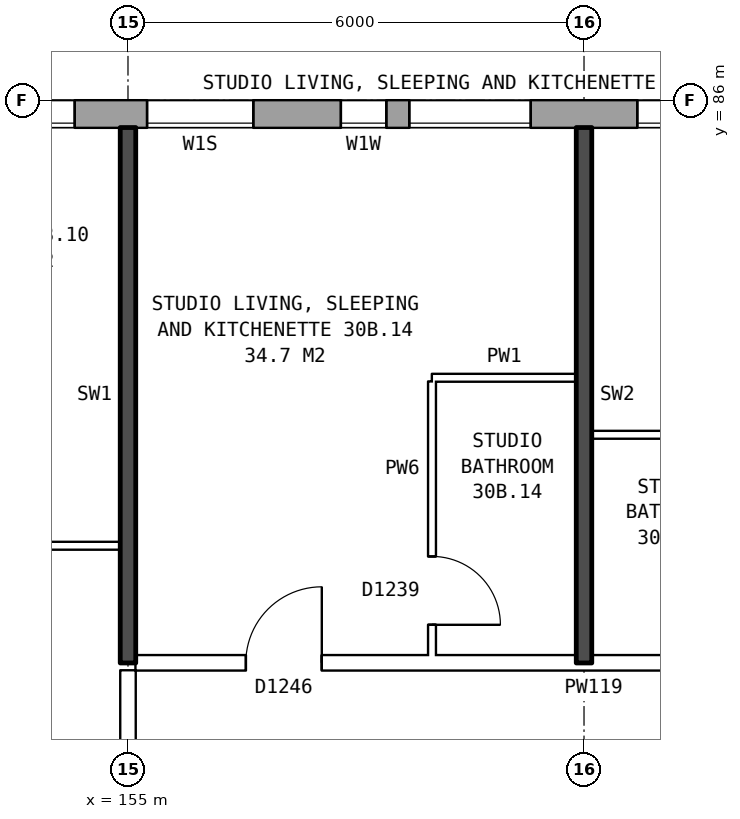
"""IFC4 building model, lengths in metres.
Left out: names, types, materials, properties, quantities, classifications, styles, units other than length and angle.
Written with IfcOpenShell. Run it as: python <this file> out.ifc"""

import sys

from ifc_helpers import new_model, si_unit, direction, frame, frame_2d, origin, place, context, subcontext, project, spatial, rectangle, extrude, element, fill, save


model = new_model("IFC4")
c1 = context("Model", 3, precision=1e-05, world=origin(), true_north=direction((0.0, 1.0)))
c2 = subcontext(c1, "Body", "Model", "MODEL_VIEW")
j1 = project(units=[si_unit("LENGTHUNIT", "METRE"), si_unit("PLANEANGLEUNIT", "RADIAN")], contexts=[c1])
p1 = place(None, origin())
s1 = spatial("IfcSite", under=j1, at=p1, CompositionType="ELEMENT")
p2 = place(p1, origin())
s2 = spatial("IfcBuilding", under=s1, at=p2, CompositionType="ELEMENT")
p3 = place(p2, frame((0.0, 0.0, 108.8)))
s3 = spatial("IfcBuildingStorey", under=s2, at=p3, CompositionType="ELEMENT", Elevation=108.8)
p4 = place(p3, frame((170.925, 85.82, 0.0), z_axis=(0.0, 0.0, 1.0), x_axis=(-1.0, 0.0, 0.0)))
e1 = element("IfcWall", 1, at=p4, inside=s3, PredefinedType="STANDARD", context=c2, shape_type="SweptSolid", body=[
    extrude(rectangle(XDim=36.851, YDim=0.36, at=frame_2d((18.425, 0.0))), origin(), (0.0, 0.0, 1.0), 2.85),
])
p5 = place(p4, frame((1.625, 0.0, 0.8)))
e2 = element("IfcOpeningElement", 2, at=p5, cuts=e1, PredefinedType="OPENING", context=c2, shape_type="SweptSolid", body=[
    extrude(rectangle(XDim=1.6, YDim=1.8, at=frame_2d((0.8, 0.9))), frame((0.0, 0.19, 0.0), z_axis=(0.0, -1.0, 0.0), x_axis=(1.0, 0.0, 0.0)), (0.0, 0.0, 1.0), 0.38),
])
p6 = place(p4, frame((4.625, 0.0, 0.8)))
e3 = element("IfcOpeningElement", 3, at=p6, cuts=e1, PredefinedType="OPENING", context=c2, shape_type="SweptSolid", body=[
    extrude(rectangle(XDim=1.6, YDim=1.8, at=frame_2d((0.8, 0.9))), frame((0.0, 0.19, 0.0), z_axis=(0.0, -1.0, 0.0), x_axis=(1.0, 0.0, 0.0)), (0.0, 0.0, 1.0), 0.38),
])
p7 = place(p4, frame((7.625, 0.0, 0.8)))
e4 = element("IfcOpeningElement", 4, at=p7, cuts=e1, PredefinedType="OPENING", context=c2, shape_type="SweptSolid", body=[
    extrude(rectangle(XDim=1.6, YDim=1.8, at=frame_2d((0.8, 0.9))), frame((0.0, 0.19, 0.0), z_axis=(0.0, -1.0, 0.0), x_axis=(1.0, 0.0, 0.0)), (0.0, 0.0, 1.0), 0.38),
])
p8 = place(p4, frame((10.625, 0.0, 0.8)))
e5 = element("IfcOpeningElement", 5, at=p8, cuts=e1, PredefinedType="OPENING", context=c2, shape_type="SweptSolid", body=[
    extrude(rectangle(XDim=1.6, YDim=1.8, at=frame_2d((0.8, 0.9))), frame((0.0, 0.19, 0.0), z_axis=(0.0, -1.0, 0.0), x_axis=(1.0, 0.0, 0.0)), (0.0, 0.0, 1.0), 0.38),
])
p9 = place(p4, frame((12.525, 0.0, 1.7)))
e6 = element("IfcOpeningElement", 6, at=p9, cuts=e1, PredefinedType="OPENING", context=c2, shape_type="SweptSolid", body=[
    extrude(rectangle(XDim=0.6, YDim=0.9, at=frame_2d((0.3, 0.45))), frame((0.0, 0.19, 0.0), z_axis=(0.0, -1.0, 0.0), x_axis=(1.0, 0.0, 0.0)), (0.0, 0.0, 1.0), 0.38),
])
p10 = place(p4, frame((16.625, 0.0, 0.8)))
e7 = element("IfcOpeningElement", 7, at=p10, cuts=e1, PredefinedType="OPENING", context=c2, shape_type="SweptSolid", body=[
    extrude(rectangle(XDim=1.6, YDim=1.8, at=frame_2d((0.8, 0.9))), frame((0.0, 0.19, 0.0), z_axis=(0.0, -1.0, 0.0), x_axis=(1.0, 0.0, 0.0)), (0.0, 0.0, 1.0), 0.38),
])
p11 = place(p4, frame((19.625, 0.0, 0.8)))
e8 = element("IfcOpeningElement", 8, at=p11, cuts=e1, PredefinedType="OPENING", context=c2, shape_type="SweptSolid", body=[
    extrude(rectangle(XDim=1.6, YDim=1.8, at=frame_2d((0.8, 0.9))), frame((0.0, 0.19, 0.0), z_axis=(0.0, -1.0, 0.0), x_axis=(1.0, 0.0, 0.0)), (0.0, 0.0, 1.0), 0.38),
])
p12 = place(p4, frame((22.125, 0.0, 0.15)))
e9 = element("IfcOpeningElement", 9, at=p12, cuts=e1, PredefinedType="OPENING", context=c2, shape_type="SweptSolid", body=[
    extrude(rectangle(XDim=1.2, YDim=0.9, at=frame_2d((0.6, 0.45))), frame((0.0, 0.19, 0.0), z_axis=(0.0, -1.0, 0.0), x_axis=(1.0, 0.0, 0.0)), (0.0, 0.0, 1.0), 0.38),
])
p13 = place(p4, frame((25.625, 0.0, 0.8)))
e10 = element("IfcOpeningElement", 10, at=p13, cuts=e1, PredefinedType="OPENING", context=c2, shape_type="SweptSolid", body=[
    extrude(rectangle(XDim=1.6, YDim=1.8, at=frame_2d((0.8, 0.9))), frame((0.0, 0.19, 0.0), z_axis=(0.0, -1.0, 0.0), x_axis=(1.0, 0.0, 0.0)), (0.0, 0.0, 1.0), 0.38),
])
p14 = place(p4, frame((28.625, 0.0, 0.8)))
e11 = element("IfcOpeningElement", 11, at=p14, cuts=e1, PredefinedType="OPENING", context=c2, shape_type="SweptSolid", body=[
    extrude(rectangle(XDim=1.6, YDim=1.8, at=frame_2d((0.8, 0.9))), frame((0.0, 0.19, 0.0), z_axis=(0.0, -1.0, 0.0), x_axis=(1.0, 0.0, 0.0)), (0.0, 0.0, 1.0), 0.38),
])
p15 = place(p4, frame((31.625, 0.0, 0.8)))
e12 = element("IfcOpeningElement", 12, at=p15, cuts=e1, PredefinedType="OPENING", context=c2, shape_type="SweptSolid", body=[
    extrude(rectangle(XDim=1.6, YDim=1.8, at=frame_2d((0.8, 0.9))), frame((0.0, 0.19, 0.0), z_axis=(0.0, -1.0, 0.0), x_axis=(1.0, 0.0, 0.0)), (0.0, 0.0, 1.0), 0.38),
])
p16 = place(p4, frame((34.625, 0.0, 0.8)))
e13 = element("IfcOpeningElement", 13, at=p16, cuts=e1, PredefinedType="OPENING", context=c2, shape_type="SweptSolid", body=[
    extrude(rectangle(XDim=1.6, YDim=1.8, at=frame_2d((0.8, 0.9))), frame((0.0, 0.19, 0.0), z_axis=(0.0, -1.0, 0.0), x_axis=(1.0, 0.0, 0.0)), (0.0, 0.0, 1.0), 0.38),
])
p17 = place(p4, frame((14.275, 0.0, 0.8)))
e14 = element("IfcOpeningElement", 14, at=p17, cuts=e1, PredefinedType="OPENING", context=c2, shape_type="SweptSolid", body=[
    extrude(rectangle(XDim=1.4, YDim=0.9, at=frame_2d((0.7, 0.45))), frame((0.0, 0.19, 0.0), z_axis=(0.0, -1.0, 0.0), x_axis=(1.0, 0.0, 0.0)), (0.0, 0.0, 1.0), 0.38),
])
p18 = place(p4, frame((23.775, 0.0, 1.65)))
e15 = element("IfcOpeningElement", 15, at=p18, cuts=e1, PredefinedType="OPENING", context=c2, shape_type="SweptSolid", body=[
    extrude(rectangle(XDim=1.0, YDim=0.9, at=frame_2d((0.5, 0.45))), frame((0.0, 0.19, 0.0), z_axis=(0.0, -1.0, 0.0), x_axis=(1.0, 0.0, 0.0)), (0.0, 0.0, 1.0), 0.38),
])
p19 = place(p3, frame((155.1, 78.6, 0.0), z_axis=(0.0, 0.0, 1.0), x_axis=(1.0, 0.0, 0.0)))
e16 = element("IfcWall", 16, at=p19, inside=s3, PredefinedType="PARTITIONING", context=c2, shape_type="SweptSolid", body=[
    extrude(rectangle(XDim=18.54, YDim=0.2, at=frame_2d((9.27, 0.0))), origin(), (0.0, 0.0, 1.0), 2.85),
])
p20 = place(p19, frame((1.45, 0.0, 0.0)))
e17 = element("IfcOpeningElement", 17, at=p20, cuts=e16, PredefinedType="OPENING", context=c2, shape_type="SweptSolid", body=[
    extrude(rectangle(XDim=1.0, YDim=2.1, at=frame_2d((0.5, 1.05))), frame((0.0, 0.11, 0.0), z_axis=(0.0, -1.0, 0.0), x_axis=(1.0, 0.0, 0.0)), (0.0, 0.0, 1.0), 0.22),
])
p21 = place(p19, frame((9.6, 0.0, 0.0)))
e18 = element("IfcOpeningElement", 18, at=p21, cuts=e16, PredefinedType="OPENING", context=c2, shape_type="SweptSolid", body=[
    extrude(rectangle(XDim=1.0, YDim=2.1, at=frame_2d((0.5, 1.05))), frame((0.0, 0.11, 0.0), z_axis=(0.0, -1.0, 0.0), x_axis=(1.0, 0.0, 0.0)), (0.0, 0.0, 1.0), 0.22),
])
p22 = place(p19, frame((15.92, 0.0, 0.0)))
e19 = element("IfcOpeningElement", 19, at=p22, cuts=e16, PredefinedType="OPENING", context=c2, shape_type="SweptSolid", body=[
    extrude(rectangle(XDim=1.0, YDim=2.1, at=frame_2d((0.5, 1.05))), frame((0.0, 0.11, 0.0), z_axis=(0.0, -1.0, 0.0), x_axis=(1.0, 0.0, 0.0)), (0.0, 0.0, 1.0), 0.22),
])
p23 = place(p3, frame((152.0, 80.14, 0.0), z_axis=(0.0, 0.0, 1.0), x_axis=(1.0, 0.0, 0.0)))
e20 = element("IfcWall", 20, at=p23, inside=s3, PredefinedType="PARTITIONING", context=c2, shape_type="SweptSolid", body=[
    extrude(rectangle(XDim=2.9, YDim=0.1, at=frame_2d((1.45, 0.0))), origin(), (0.0, 0.0, 1.0), 2.85),
])
p24 = place(p23, frame((1.0, 0.0, 0.0)))
e21 = element("IfcOpeningElement", 21, at=p24, cuts=e20, PredefinedType="OPENING", context=c2, shape_type="SweptSolid", body=[
    extrude(rectangle(XDim=0.9, YDim=2.1, at=frame_2d((0.45, 1.05))), frame((0.0, 0.06, 0.0), z_axis=(0.0, -1.0, 0.0), x_axis=(1.0, 0.0, 0.0)), (0.0, 0.0, 1.0), 0.12),
])
p25 = place(p3, frame((161.1, 81.6, 0.0), z_axis=(0.0, 0.0, 1.0), x_axis=(1.0, 0.0, 0.0)))
e22 = element("IfcWall", 22, at=p25, inside=s3, PredefinedType="PARTITIONING", context=c2, shape_type="SweptSolid", body=[
    extrude(rectangle(XDim=2.3, YDim=0.1, at=frame_2d((1.15, 0.0))), origin(), (0.0, 0.0, 1.0), 2.85),
])
p26 = place(p3, frame((159.0, 82.35, 0.0), z_axis=(0.0, 0.0, 1.0), x_axis=(1.0, 0.0, 0.0)))
e23 = element("IfcWall", 23, at=p26, inside=s3, PredefinedType="PARTITIONING", context=c2, shape_type="SweptSolid", body=[
    extrude(rectangle(XDim=1.9, YDim=0.1, at=frame_2d((0.95, 0.0))), origin(), (0.0, 0.0, 1.0), 2.85),
])
p27 = place(p3, frame((155.0, 76.3, 0.0), z_axis=(0.0, 0.0, 1.0), x_axis=(0.0, 1.0, 0.0)))
e24 = element("IfcWall", 24, at=p27, inside=s3, PredefinedType="PARTITIONING", context=c2, shape_type="SweptSolid", body=[
    extrude(rectangle(XDim=2.2, YDim=0.2, at=frame_2d((1.1, 0.0))), origin(), (0.0, 0.0, 1.0), 2.85),
])
p28 = place(p3, frame((155.0, 78.6, 0.0), z_axis=(0.0, 0.0, 1.0), x_axis=(0.0, 1.0, 0.0)))
e25 = element("IfcWall", 25, at=p28, inside=s3, PredefinedType="SOLIDWALL", context=c2, shape_type="SweptSolid", body=[
    extrude(rectangle(XDim=7.04, YDim=0.2, at=frame_2d((3.52, 0.0))), origin(), (0.0, 0.0, 1.0), 2.85),
])
p29 = place(p3, frame((159.0, 78.7, 0.0), z_axis=(0.0, 0.0, 1.0), x_axis=(0.0, 1.0, 0.0)))
e26 = element("IfcWall", 26, at=p29, inside=s3, PredefinedType="PARTITIONING", context=c2, shape_type="SweptSolid", body=[
    extrude(rectangle(XDim=3.6, YDim=0.1, at=frame_2d((1.8, 0.0))), origin(), (0.0, 0.0, 1.0), 2.85),
])
p30 = place(p29, frame((0.4, 0.0, 0.0)))
e27 = element("IfcOpeningElement", 27, at=p30, cuts=e26, PredefinedType="OPENING", context=c2, shape_type="SweptSolid", body=[
    extrude(rectangle(XDim=0.9, YDim=2.1, at=frame_2d((0.45, 1.05))), frame((0.0, 0.06, 0.0), z_axis=(0.0, -1.0, 0.0), x_axis=(1.0, 0.0, 0.0)), (0.0, 0.0, 1.0), 0.12),
])
p31 = place(p3, frame((161.0, 78.6, 0.0), z_axis=(0.0, 0.0, 1.0), x_axis=(0.0, 1.0, 0.0)))
e28 = element("IfcWall", 28, at=p31, inside=s3, PredefinedType="SOLIDWALL", context=c2, shape_type="SweptSolid", body=[
    extrude(rectangle(XDim=7.04, YDim=0.2, at=frame_2d((3.52, 0.0))), origin(), (0.0, 0.0, 1.0), 2.85),
])
p32 = place(p7, origin())
e29 = element("IfcWindow", 29, at=p32, inside=s3, PartitioningType="SINGLE_PANEL", PredefinedType="WINDOW", context=c2, shape_type="SweptSolid", body=[
    extrude(rectangle(XDim=1.6, YDim=1.8, at=frame_2d((0.8, 0.9))), frame((0.0, 0.15, 0.0), z_axis=(0.0, -1.0, 0.0), x_axis=(1.0, 0.0, 0.0)), (0.0, 0.0, 1.0), 0.06),
])
fill(e4, e29)
p33 = place(p8, origin())
e30 = element("IfcWindow", 30, at=p33, inside=s3, PartitioningType="SINGLE_PANEL", PredefinedType="WINDOW", context=c2, shape_type="SweptSolid", body=[
    extrude(rectangle(XDim=1.6, YDim=1.8, at=frame_2d((0.8, 0.9))), frame((0.0, 0.15, 0.0), z_axis=(0.0, -1.0, 0.0), x_axis=(1.0, 0.0, 0.0)), (0.0, 0.0, 1.0), 0.06),
])
fill(e5, e30)
p34 = place(p9, origin())
e31 = element("IfcWindow", 31, at=p34, inside=s3, PartitioningType="SINGLE_PANEL", PredefinedType="WINDOW", context=c2, shape_type="SweptSolid", body=[
    extrude(rectangle(XDim=0.6, YDim=0.9, at=frame_2d((0.3, 0.45))), frame((0.0, 0.15, 0.0), z_axis=(0.0, -1.0, 0.0), x_axis=(1.0, 0.0, 0.0)), (0.0, 0.0, 1.0), 0.06),
])
fill(e6, e31)
p35 = place(p10, origin())
e32 = element("IfcWindow", 32, at=p35, inside=s3, PartitioningType="SINGLE_PANEL", PredefinedType="WINDOW", context=c2, shape_type="SweptSolid", body=[
    extrude(rectangle(XDim=1.6, YDim=1.8, at=frame_2d((0.8, 0.9))), frame((0.0, 0.15, 0.0), z_axis=(0.0, -1.0, 0.0), x_axis=(1.0, 0.0, 0.0)), (0.0, 0.0, 1.0), 0.06),
])
fill(e7, e32)
p36 = place(p20, origin())
e33 = element("IfcDoor", 33, at=p36, inside=s3, OperationType="SINGLE_SWING_RIGHT", PredefinedType="DOOR", context=c2, shape_type="SweptSolid", body=[
    extrude(rectangle(XDim=1.0, YDim=2.1, at=frame_2d((0.5, 1.05))), frame((0.0, 0.025, 0.0), z_axis=(0.0, -1.0, 0.0), x_axis=(1.0, 0.0, 0.0)), (0.0, 0.0, 1.0), 0.05),
])
fill(e17, e33)
p37 = place(p30, frame((0.9, 0.0, 0.0), z_axis=(0.0, 0.0, 1.0), x_axis=(-1.0, 0.0, 0.0)))
e34 = element("IfcDoor", 34, at=p37, inside=s3, OperationType="SINGLE_SWING_RIGHT", PredefinedType="DOOR", context=c2, shape_type="SweptSolid", body=[
    extrude(rectangle(XDim=0.9, YDim=2.1, at=frame_2d((0.45, 1.05))), frame((0.0, 0.025, 0.0), z_axis=(0.0, -1.0, 0.0), x_axis=(1.0, 0.0, 0.0)), (0.0, 0.0, 1.0), 0.05),
])
fill(e27, e34)
p38 = place(p17, origin())
e35 = element("IfcWindow", 35, at=p38, inside=s3, PartitioningType="SINGLE_PANEL", PredefinedType="WINDOW", context=c2, shape_type="SweptSolid", body=[
    extrude(rectangle(XDim=1.4, YDim=0.9, at=frame_2d((0.7, 0.45))), frame((0.0, 0.15, 0.0), z_axis=(0.0, -1.0, 0.0), x_axis=(1.0, 0.0, 0.0)), (0.0, 0.0, 1.0), 0.06),
])
fill(e14, e35)
save(model, sys.argv[1])
